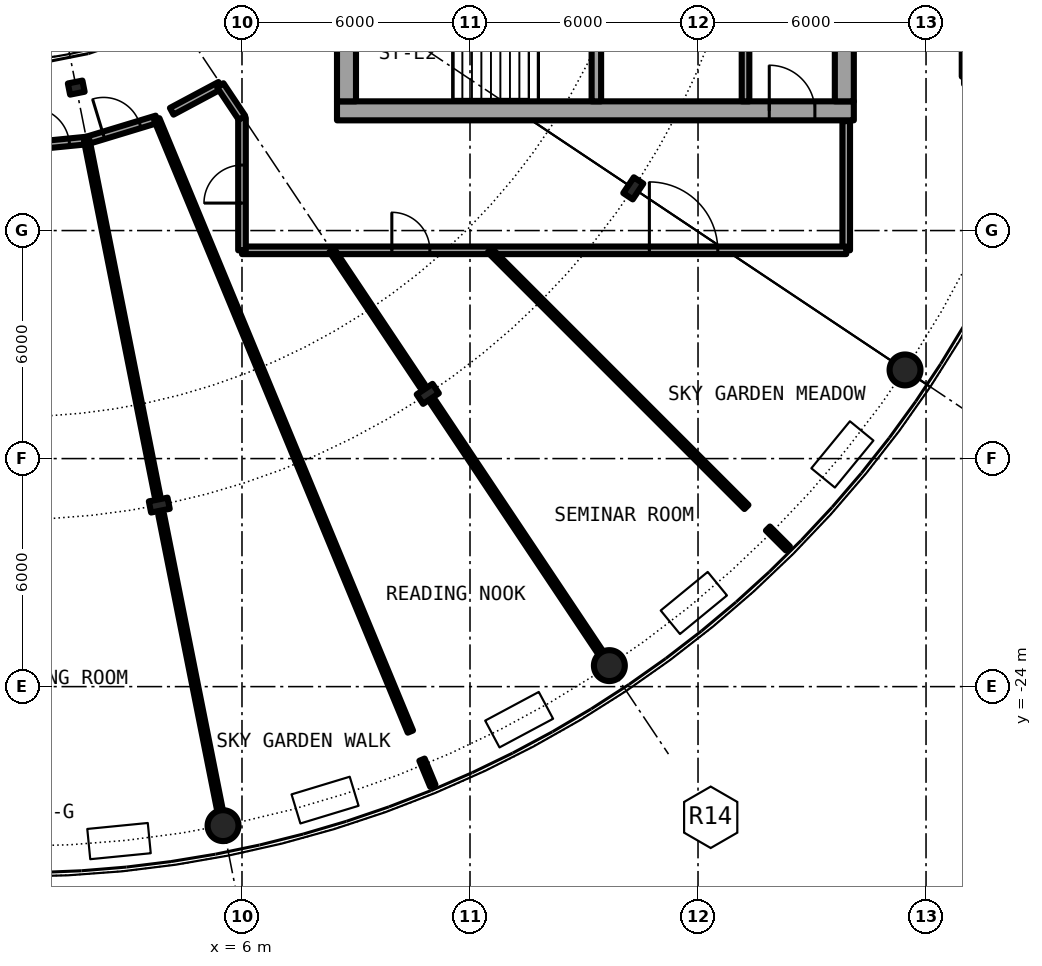
"""IFC4 building model, lengths in metres.
Left out: names, types, materials, properties, quantities, classifications, styles, units other than length and angle.
Written with IfcOpenShell. Run it as: python <this file> out.ifc"""

import sys

from ifc_helpers import new_model, si_unit, direction, frame, frame_2d, origin, origin_2d, place, context, subcontext, project, spatial, rectangle, hollow_circle, i_section, extrude, element, fill, save


model = new_model("IFC4")
c1 = context("Model", 3, precision=1e-05, world=origin(), true_north=direction((0.0, 1.0)))
c2 = subcontext(c1, "Body", "Model", "MODEL_VIEW")
j1 = project(units=[si_unit("LENGTHUNIT", "METRE"), si_unit("PLANEANGLEUNIT", "RADIAN")], contexts=[c1])
p1 = place(None, origin())
s1 = spatial("IfcSite", under=j1, at=p1, CompositionType="ELEMENT")
p2 = place(p1, origin())
s2 = spatial("IfcBuilding", under=s1, at=p2, CompositionType="ELEMENT")
p3 = place(p2, frame((0.0, 0.0, 179.9)))
s3 = spatial("IfcBuildingStorey", under=s2, at=p3, CompositionType="ELEMENT", Elevation=179.9)
for number, where, z_axis, x_axis in (
    (1, (5.501, -27.658, 0.0), (0.0, 0.0, 1.0), (1.0, 0.0, 0.0)),
    (2, (15.667, -23.448, 0.0), (0.0, 0.0, 1.0), (1.0, 0.0, 0.0)),
    (3, (23.448, -15.667, 0.0), (0.0, 0.0, 1.0), (1.0, 0.0, 0.0)),
):
    element("IfcColumn", number, at=place(p3, frame(where, z_axis=z_axis, x_axis=x_axis)), inside=s3, PredefinedType="COLUMN", context=c2, shape_type="SweptSolid", body=[
        extrude(hollow_circle(Radius=0.406, WallThickness=0.04, at=origin_2d()), origin(), (0.0, 0.0, 1.0), 6.1),
    ])
for number, where, z_axis, x_axis in (
    (4, (3.824, -19.223, 0.0), (0.0, 0.0, 1.0), (0.195, -0.981, 0.0)),
    (5, (10.889, -16.297, 0.0), (0.0, 0.0, 1.0), (0.556, -0.831, 0.0)),
    (6, (16.297, -10.889, 0.0), (0.0, 0.0, 1.0), (0.831, -0.556, 0.0)),
):
    element("IfcColumn", number, at=place(p3, frame(where, z_axis=z_axis, x_axis=x_axis)), inside=s3, PredefinedType="COLUMN", context=c2, shape_type="SweptSolid", body=[
        extrude(i_section(OverallWidth=0.3, OverallDepth=0.5, WebThickness=0.014, FlangeThickness=0.028, FilletRadius=0.027, at=origin_2d()), origin(), (0.0, 0.0, 1.0), 6.1),
    ])
p4 = place(p3, frame((1.639, -8.239, 0.0), z_axis=(0.0, 0.0, 1.0), x_axis=(0.195090322016, -0.980785280403, 0.0)))
e7 = element("IfcColumn", 7, at=p4, inside=s3, PredefinedType="COLUMN", context=c2, shape_type="SweptSolid", body=[
    extrude(i_section(OverallWidth=0.3, OverallDepth=0.39, WebThickness=0.011, FlangeThickness=0.019, FilletRadius=0.027, at=origin_2d()), origin(), (0.0, 0.0, 1.0), 6.1),
])
p5 = place(p3, frame((8.5, -8.85, 0.0), z_axis=(0.0, 0.0, 1.0), x_axis=(1.0, 0.0, 0.0)))
e8 = element("IfcWall", 8, at=p5, inside=s3, PredefinedType="SHEAR", context=c2, shape_type="SweptSolid", body=[
    extrude(rectangle(XDim=13.6, YDim=0.5, at=frame_2d((6.8, 0.0))), origin(), (0.0, 0.0, 1.0), 6.1),
])
p6 = place(p5, frame((11.375, 0.0, 0.0)))
e9 = element("IfcOpeningElement", 9, at=p6, cuts=e8, PredefinedType="OPENING", context=c2, shape_type="SweptSolid", body=[
    extrude(rectangle(XDim=1.2, YDim=2.3, at=frame_2d((0.6, 1.15))), frame((0.0, 0.26, 0.0), z_axis=(0.0, -1.0, 0.0), x_axis=(1.0, 0.0, 0.0)), (0.0, 0.0, 1.0), 0.52),
])
p7 = place(p3, frame((21.85, 8.6, 0.0), z_axis=(0.0, 0.0, 1.0), x_axis=(0.0, -1.0, 0.0)))
e10 = element("IfcWall", 10, at=p7, inside=s3, PredefinedType="SHEAR", context=c2, shape_type="SweptSolid", body=[
    extrude(rectangle(XDim=17.2, YDim=0.5, at=frame_2d((8.6, 0.0))), origin(), (0.0, 0.0, 1.0), 6.1),
])
p8 = place(p7, frame((7.4, 0.0, 0.0)))
e11 = element("IfcOpeningElement", 11, at=p8, cuts=e10, PredefinedType="OPENING", context=c2, shape_type="SweptSolid", body=[
    extrude(rectangle(XDim=2.4, YDim=2.3, at=frame_2d((1.2, 1.15))), frame((0.0, 0.26, 0.0), z_axis=(0.0, -1.0, 0.0), x_axis=(1.0, 0.0, 0.0)), (0.0, 0.0, 1.0), 0.52),
])
p9 = place(p3, frame((8.75, -8.6, 0.0), z_axis=(0.0, 0.0, 1.0), x_axis=(0.0, 1.0, 0.0)))
e12 = element("IfcWall", 12, at=p9, inside=s3, PredefinedType="SHEAR", context=c2, shape_type="SweptSolid", body=[
    extrude(rectangle(XDim=17.2, YDim=0.5, at=frame_2d((8.6, 0.0))), origin(), (0.0, 0.0, 1.0), 6.1),
])
p10 = place(p9, frame((7.4, 0.0, 0.1)))
e13 = element("IfcOpeningElement", 13, at=p10, cuts=e12, PredefinedType="OPENING", context=c2, shape_type="SweptSolid", body=[
    extrude(rectangle(XDim=2.4, YDim=2.2, at=frame_2d((1.2, 1.1))), frame((0.0, 0.26, 0.0), z_axis=(0.0, -1.0, 0.0), x_axis=(1.0, 0.0, 0.0)), (0.0, 0.0, 1.0), 0.52),
])
p11 = place(p3, frame((15.325, -8.6, 0.0), z_axis=(0.0, 0.0, 1.0), x_axis=(0.0, 1.0, 0.0)))
e14 = element("IfcWall", 14, at=p11, inside=s3, PredefinedType="SHEAR", context=c2, shape_type="SweptSolid", body=[
    extrude(rectangle(XDim=3.95, YDim=0.25, at=frame_2d((1.975, 0.0))), origin(), (0.0, 0.0, 1.0), 6.1),
])
p12 = place(p11, frame((2.025, 0.0, 0.0)))
e15 = element("IfcOpeningElement", 15, at=p12, cuts=e14, PredefinedType="OPENING", context=c2, shape_type="SweptSolid", body=[
    extrude(rectangle(XDim=1.2, YDim=2.3, at=frame_2d((0.6, 1.15))), frame((0.0, 0.135, 0.0), z_axis=(0.0, -1.0, 0.0), x_axis=(1.0, 0.0, 0.0)), (0.0, 0.0, 1.0), 0.27),
])
p13 = place(p3, frame((19.25, -8.6, 0.0), z_axis=(0.0, 0.0, 1.0), x_axis=(0.0, 1.0, 0.0)))
e16 = element("IfcWall", 16, at=p13, inside=s3, PredefinedType="SOLIDWALL", context=c2, shape_type="SweptSolid", body=[
    extrude(rectangle(XDim=7.025, YDim=0.2, at=frame_2d((3.513, 0.0))), origin(), (0.0, 0.0, 1.0), 5.7),
])
p14 = place(p13, frame((2.35, 0.0, 0.0)))
e17 = element("IfcOpeningElement", 17, at=p14, cuts=e16, PredefinedType="OPENING", context=c2, shape_type="SweptSolid", body=[
    extrude(rectangle(XDim=1.1, YDim=2.3, at=frame_2d((0.55, 1.15))), frame((0.0, 0.11, 0.0), z_axis=(0.0, -1.0, 0.0), x_axis=(1.0, 0.0, 0.0)), (0.0, 0.0, 1.0), 0.22),
])
p15 = place(p3, frame((25.0, -3.5, 0.0), z_axis=(0.0, 0.0, 1.0), x_axis=(0.0, -1.0, 0.0)))
e18 = element("IfcWall", 18, at=p15, inside=s3, PredefinedType="PARTITIONING", context=c2, shape_type="SweptSolid", body=[
    extrude(rectangle(XDim=4.45, YDim=0.12, at=frame_2d((2.225, 0.0))), origin(), (0.0, 0.0, 1.0), 5.7),
])
p16 = place(p15, frame((0.4, 0.0, 0.1)))
e19 = element("IfcOpeningElement", 19, at=p16, cuts=e18, PredefinedType="OPENING", context=c2, shape_type="SweptSolid", body=[
    extrude(rectangle(XDim=3.6, YDim=5.35, at=frame_2d((1.8, 2.675))), frame((0.0, 0.07, 0.0), z_axis=(0.0, -1.0, 0.0), x_axis=(1.0, 0.0, 0.0)), (0.0, 0.0, 1.0), 0.14),
])
p17 = place(p3, frame((21.9, -12.52, 0.0), z_axis=(0.0, 0.0, 1.0), x_axis=(0.0, 1.0, 0.0)))
e20 = element("IfcWall", 20, at=p17, inside=s3, PredefinedType="PARTITIONING", context=c2, shape_type="SweptSolid", body=[
    extrude(rectangle(XDim=3.4, YDim=0.2, at=frame_2d((1.7, 0.0))), origin(), (0.0, 0.0, 1.0), 5.7),
])
p18 = place(p3, frame((6.0, -12.52, 0.0), z_axis=(0.0, 0.0, 1.0), x_axis=(1.0, 0.0, 0.0)))
e21 = element("IfcWall", 21, at=p18, inside=s3, PredefinedType="PARTITIONING", context=c2, shape_type="SweptSolid", body=[
    extrude(rectangle(XDim=15.9, YDim=0.2, at=frame_2d((7.95, 0.0))), origin(), (0.0, 0.0, 1.0), 5.7),
])
p19 = place(p18, frame((3.943, 0.0, 0.0)))
e22 = element("IfcOpeningElement", 22, at=p19, cuts=e21, PredefinedType="OPENING", context=c2, shape_type="SweptSolid", body=[
    extrude(rectangle(XDim=1.0, YDim=2.3, at=frame_2d((0.5, 1.15))), frame((0.0, 0.11, 0.0), z_axis=(0.0, -1.0, 0.0), x_axis=(1.0, 0.0, 0.0)), (0.0, 0.0, 1.0), 0.22),
])
p20 = place(p18, frame((10.72, 0.0, 0.0)))
e23 = element("IfcOpeningElement", 23, at=p20, cuts=e21, PredefinedType="OPENING", context=c2, shape_type="SweptSolid", body=[
    extrude(rectangle(XDim=1.8, YDim=2.3, at=frame_2d((0.9, 1.15))), frame((0.0, 0.11, 0.0), z_axis=(0.0, -1.0, 0.0), x_axis=(1.0, 0.0, 0.0)), (0.0, 0.0, 1.0), 0.22),
])
p21 = place(p3, frame((0.0, -9.82, 0.0), z_axis=(0.0, 0.0, 1.0), x_axis=(0.995171860647, 0.098147683504, 0.0)))
e24 = element("IfcWall", 24, at=p21, inside=s3, PredefinedType="PARTITIONING", context=c2, shape_type="SweptSolid", body=[
    extrude(rectangle(XDim=1.925, YDim=0.2, at=frame_2d((0.963, 0.0))), origin(), (0.0, 0.0, 1.0), 5.7),
])
p22 = place(p21, frame((0.463, 0.0, 0.0)))
e25 = element("IfcOpeningElement", 25, at=p22, cuts=e24, PredefinedType="OPENING", context=c2, shape_type="SweptSolid", body=[
    extrude(rectangle(XDim=1.0, YDim=2.3, at=frame_2d((0.5, 1.15))), frame((0.0, 0.11, 0.0), z_axis=(0.0, -1.0, 0.0), x_axis=(1.0, 0.0, 0.0)), (0.0, 0.0, 1.0), 0.22),
])
p23 = place(p3, frame((1.916, -9.631, 0.0), z_axis=(0.0, 0.0, 1.0), x_axis=(0.956896312675, 0.29042976223, 0.0)))
e26 = element("IfcWall", 26, at=p23, inside=s3, PredefinedType="PARTITIONING", context=c2, shape_type="SweptSolid", body=[
    extrude(rectangle(XDim=1.925, YDim=0.2, at=frame_2d((0.962, 0.0))), origin(), (0.0, 0.0, 1.0), 5.7),
])
p24 = place(p23, frame((0.462, 0.0, 0.0)))
e27 = element("IfcOpeningElement", 27, at=p24, cuts=e26, PredefinedType="OPENING", context=c2, shape_type="SweptSolid", body=[
    extrude(rectangle(XDim=1.0, YDim=2.3, at=frame_2d((0.5, 1.15))), frame((0.0, 0.11, 0.0), z_axis=(0.0, -1.0, 0.0), x_axis=(1.0, 0.0, 0.0)), (0.0, 0.0, 1.0), 0.22),
])
p25 = place(p3, frame((4.151, -8.862, 0.0), z_axis=(0.0, 0.0, 1.0), x_axis=(0.88193287619, 0.471375011954, 0.0)))
e28 = element("IfcWall", 28, at=p25, inside=s3, PredefinedType="PARTITIONING", context=c2, shape_type="SweptSolid", body=[
    extrude(rectangle(XDim=1.449, YDim=0.2, at=frame_2d((0.725, 0.0))), origin(), (0.0, 0.0, 1.0), 5.7),
])
p26 = place(p3, frame((6.0, -12.52, 0.0), z_axis=(0.0, 0.0, 1.0), x_axis=(0.0, 1.0, 0.0)))
e29 = element("IfcWall", 29, at=p26, inside=s3, PredefinedType="PARTITIONING", context=c2, shape_type="SweptSolid", body=[
    extrude(rectangle(XDim=3.486, YDim=0.2, at=frame_2d((1.743, 0.0))), origin(), (0.0, 0.0, 1.0), 5.7),
])
p27 = place(p26, frame((1.243, 0.0, 0.0)))
e30 = element("IfcOpeningElement", 30, at=p27, cuts=e29, PredefinedType="OPENING", context=c2, shape_type="SweptSolid", body=[
    extrude(rectangle(XDim=1.0, YDim=2.3, at=frame_2d((0.5, 1.15))), frame((0.0, 0.11, 0.0), z_axis=(0.0, -1.0, 0.0), x_axis=(1.0, 0.0, 0.0)), (0.0, 0.0, 1.0), 0.22),
])
p28 = place(p3, frame((5.429, -8.179, 0.0), z_axis=(0.0, 0.0, 1.0), x_axis=(0.555412364489, -0.831575075007, 0.0)))
e31 = element("IfcWall", 31, at=p28, inside=s3, PredefinedType="PARTITIONING", context=c2, shape_type="SweptSolid", body=[
    extrude(rectangle(XDim=1.028, YDim=0.2, at=frame_2d((0.514, 0.0))), origin(), (0.0, 0.0, 1.0), 5.7),
])
p29 = place(p3, frame((1.916, -9.631, 0.0), z_axis=(0.0, 0.0, 1.0), x_axis=(0.195056807593, -0.980791946241, 0.0)))
e32 = element("IfcWall", 32, at=p29, inside=s3, PredefinedType="PARTITIONING", context=c2, shape_type="SweptSolid", body=[
    extrude(rectangle(XDim=9.53, YDim=0.15, at=frame_2d((4.765, 0.0))), origin(), (0.0, 0.0, 1.0), 5.7),
])
p30 = place(p3, frame((3.758, -9.072, 0.0), z_axis=(0.0, 0.0, 1.0), x_axis=(0.38265514428, -0.923891249312, 0.0)))
e33 = element("IfcWall", 33, at=p30, inside=s3, PredefinedType="PARTITIONING", context=c2, shape_type="SweptSolid", body=[
    extrude(rectangle(XDim=17.438, YDim=0.15, at=frame_2d((8.719, 0.0))), origin(), (0.0, 0.0, 1.0), 5.7),
])
p31 = place(p3, frame((3.872, -19.469, 0.0), z_axis=(0.0, 0.0, 1.0), x_axis=(0.195194883509, -0.980764476035, 0.0)))
e34 = element("IfcWall", 34, at=p31, inside=s3, PredefinedType="PARTITIONING", context=c2, shape_type="SweptSolid", body=[
    extrude(rectangle(XDim=7.951, YDim=0.15, at=frame_2d((3.976, 0.0))), origin(), (0.0, 0.0, 1.0), 5.7),
])
p32 = place(p3, frame((8.365, -12.521, 0.0), z_axis=(0.0, 0.0, 1.0), x_axis=(0.555448182904, -0.831551150627, 0.0)))
e35 = element("IfcWall", 35, at=p32, inside=s3, PredefinedType="PARTITIONING", context=c2, shape_type="SweptSolid", body=[
    extrude(rectangle(XDim=4.292, YDim=0.15, at=frame_2d((2.146, 0.0))), origin(), (0.0, 0.0, 1.0), 5.7),
])
p33 = place(p3, frame((10.737, -25.922, 0.0), z_axis=(0.0, 0.0, 1.0), x_axis=(0.382535780864, -0.923940677943, 0.0)))
e36 = element("IfcWall", 36, at=p33, inside=s3, PredefinedType="PARTITIONING", context=c2, shape_type="SweptSolid", body=[
    extrude(rectangle(XDim=0.742, YDim=0.15, at=frame_2d((0.371, 0.0))), origin(), (0.0, 0.0, 1.0), 5.7),
])
p34 = place(p3, frame((11.027, -16.506, 0.0), z_axis=(0.0, 0.0, 1.0), x_axis=(0.555550253025, -0.831482962161, 0.0)))
e37 = element("IfcWall", 37, at=p34, inside=s3, PredefinedType="PARTITIONING", context=c2, shape_type="SweptSolid", body=[
    extrude(rectangle(XDim=7.951, YDim=0.15, at=frame_2d((3.975, 0.0))), origin(), (0.0, 0.0, 1.0), 5.7),
])
p35 = place(p3, frame((12.52, -12.52, 0.0), z_axis=(0.0, 0.0, 1.0), x_axis=(0.707106781187, -0.707106781187, 0.0)))
e38 = element("IfcWall", 38, at=p35, inside=s3, PredefinedType="PARTITIONING", context=c2, shape_type="SweptSolid", body=[
    extrude(rectangle(XDim=9.552, YDim=0.15, at=frame_2d((4.776, 0.0))), origin(), (0.0, 0.0, 1.0), 5.7),
])
p36 = place(p3, frame((19.84, -19.84, 0.0), z_axis=(0.0, 0.0, 1.0), x_axis=(0.707106781187, -0.707106781187, 0.0)))
e39 = element("IfcWall", 39, at=p36, inside=s3, PredefinedType="PARTITIONING", context=c2, shape_type="SweptSolid", body=[
    extrude(rectangle(XDim=0.742, YDim=0.15, at=frame_2d((0.371, 0.0))), origin(), (0.0, 0.0, 1.0), 5.7),
])
p37 = place(p6, origin())
e40 = element("IfcDoor", 40, at=p37, inside=s3, OperationType="SINGLE_SWING_LEFT", PredefinedType="DOOR", context=c2, shape_type="SweptSolid", body=[
    extrude(rectangle(XDim=1.2, YDim=2.3, at=frame_2d((0.6, 1.15))), frame((0.0, 0.025, 0.0), z_axis=(0.0, -1.0, 0.0), x_axis=(1.0, 0.0, 0.0)), (0.0, 0.0, 1.0), 0.05),
])
fill(e9, e40)
p38 = place(p22, origin())
e41 = element("IfcDoor", 41, at=p38, inside=s3, OperationType="SINGLE_SWING_LEFT", PredefinedType="DOOR", context=c2, shape_type="SweptSolid", body=[
    extrude(rectangle(XDim=1.0, YDim=2.3, at=frame_2d((0.5, 1.15))), frame((0.0, 0.025, 0.0), z_axis=(0.0, -1.0, 0.0), x_axis=(1.0, 0.0, 0.0)), (0.0, 0.0, 1.0), 0.05),
])
fill(e25, e41)
p39 = place(p27, origin())
e42 = element("IfcDoor", 42, at=p39, inside=s3, OperationType="SINGLE_SWING_LEFT", PredefinedType="DOOR", context=c2, shape_type="SweptSolid", body=[
    extrude(rectangle(XDim=1.0, YDim=2.3, at=frame_2d((0.5, 1.15))), frame((0.0, 0.025, 0.0), z_axis=(0.0, -1.0, 0.0), x_axis=(1.0, 0.0, 0.0)), (0.0, 0.0, 1.0), 0.05),
])
fill(e30, e42)
p40 = place(p19, origin())
e43 = element("IfcDoor", 43, at=p40, inside=s3, OperationType="SINGLE_SWING_LEFT", PredefinedType="DOOR", context=c2, shape_type="SweptSolid", body=[
    extrude(rectangle(XDim=1.0, YDim=2.3, at=frame_2d((0.5, 1.15))), frame((0.0, 0.025, 0.0), z_axis=(0.0, -1.0, 0.0), x_axis=(1.0, 0.0, 0.0)), (0.0, 0.0, 1.0), 0.05),
])
fill(e22, e43)
p41 = place(p24, origin())
e44 = element("IfcDoor", 44, at=p41, inside=s3, OperationType="SINGLE_SWING_LEFT", PredefinedType="DOOR", context=c2, shape_type="SweptSolid", body=[
    extrude(rectangle(XDim=1.0, YDim=2.3, at=frame_2d((0.5, 1.15))), frame((0.0, 0.025, 0.0), z_axis=(0.0, -1.0, 0.0), x_axis=(1.0, 0.0, 0.0)), (0.0, 0.0, 1.0), 0.05),
])
fill(e27, e44)
p42 = place(p20, origin())
e45 = element("IfcDoor", 45, at=p42, inside=s3, OperationType="DOUBLE_DOOR_SINGLE_SWING", PredefinedType="DOOR", context=c2, shape_type="SweptSolid", body=[
    extrude(rectangle(XDim=1.8, YDim=2.3, at=frame_2d((0.9, 1.15))), frame((0.0, 0.025, 0.0), z_axis=(0.0, -1.0, 0.0), x_axis=(1.0, 0.0, 0.0)), (0.0, 0.0, 1.0), 0.05),
])
fill(e23, e45)
save(model, sys.argv[1])
